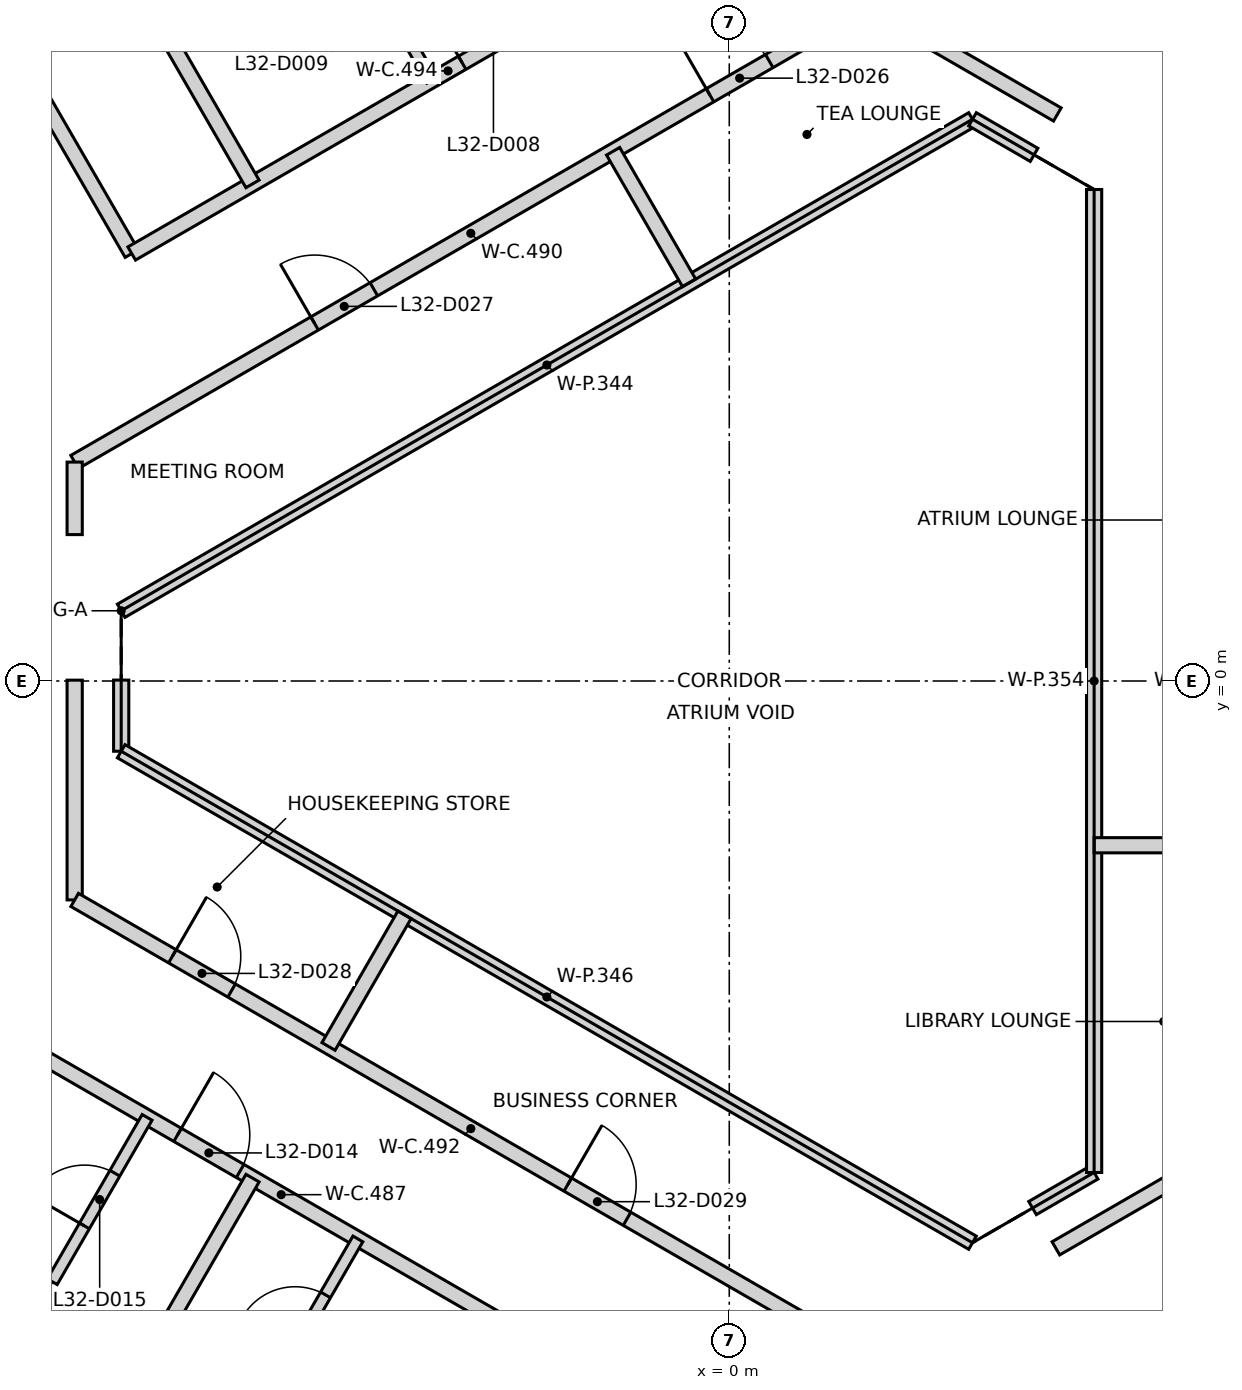
"""IFC4 building model, lengths in metres.
Left out: names, types, materials, properties, quantities, classifications, styles, units other than length and angle.
Written with IfcOpenShell. Run it as: python <this file> out.ifc"""

import sys

from ifc_helpers import new_model, si_unit, direction, frame, frame_2d, origin, place, context, subcontext, project, spatial, rectangle, extrude, element, fill, save


model = new_model("IFC4")
c1 = context("Model", 3, precision=1e-05, world=origin(), true_north=direction((0.0, 1.0)))
c2 = subcontext(c1, "Body", "Model", "MODEL_VIEW")
j1 = project(units=[si_unit("LENGTHUNIT", "METRE"), si_unit("PLANEANGLEUNIT", "RADIAN")], contexts=[c1])
p1 = place(None, origin())
s1 = spatial("IfcSite", under=j1, at=p1, CompositionType="ELEMENT")
p2 = place(p1, origin())
s2 = spatial("IfcBuilding", under=s1, at=p2, CompositionType="ELEMENT")
p3 = place(p2, frame((0.0, 0.0, 132.4)))
s3 = spatial("IfcBuildingStorey", under=s2, at=p3, CompositionType="ELEMENT", Elevation=132.4)
p4 = place(p3, frame((10.42, 6.498, 0.0), z_axis=(0.0, 0.0, 1.0), x_axis=(-0.866021906294, 0.500006057782, 0.0)))
e1 = element("IfcWall", 1, at=p4, inside=s3, PredefinedType="SHEAR", context=c2, shape_type="SweptSolid", body=[
    extrude(rectangle(XDim=11.55, YDim=0.25, at=frame_2d((5.775, 0.0))), origin(), (0.0, 0.0, 1.0), 3.2),
])
p5 = place(p4, frame((10.025, 0.0, 0.0)))
e2 = element("IfcOpeningElement", 2, at=p5, cuts=e1, PredefinedType="OPENING", context=c2, shape_type="SweptSolid", body=[
    extrude(rectangle(XDim=1.2, YDim=2.1, at=frame_2d((0.6, 1.05))), frame((0.0, 0.135, 0.0), z_axis=(0.0, -1.0, 0.0), x_axis=(1.0, 0.0, 0.0)), (0.0, 0.0, 1.0), 0.27),
])
p6 = place(p4, frame((8.725, 0.0, 0.0)))
e3 = element("IfcOpeningElement", 3, at=p6, cuts=e1, PredefinedType="OPENING", context=c2, shape_type="SweptSolid", body=[
    extrude(rectangle(XDim=1.2, YDim=2.1, at=frame_2d((0.6, 1.05))), frame((0.0, 0.135, 0.0), z_axis=(0.0, -1.0, 0.0), x_axis=(1.0, 0.0, 0.0)), (0.0, 0.0, 1.0), 0.27),
])
p7 = place(p3, frame((0.417, -12.273, 0.0), z_axis=(0.0, 0.0, 1.0), x_axis=(0.866021906294, 0.500006057782, 0.0)))
e4 = element("IfcWall", 4, at=p7, inside=s3, PredefinedType="SHEAR", context=c2, shape_type="SweptSolid", body=[
    extrude(rectangle(XDim=11.55, YDim=0.25, at=frame_2d((5.775, 0.0))), origin(), (0.0, 0.0, 1.0), 3.2),
])
p8 = place(p7, frame((10.025, 0.0, 0.0)))
e5 = element("IfcOpeningElement", 5, at=p8, cuts=e4, PredefinedType="OPENING", context=c2, shape_type="SweptSolid", body=[
    extrude(rectangle(XDim=1.2, YDim=2.1, at=frame_2d((0.6, 1.05))), frame((0.0, 0.135, 0.0), z_axis=(0.0, -1.0, 0.0), x_axis=(1.0, 0.0, 0.0)), (0.0, 0.0, 1.0), 0.27),
])
p9 = place(p7, frame((8.725, 0.0, 0.0)))
e6 = element("IfcOpeningElement", 6, at=p9, cuts=e4, PredefinedType="OPENING", context=c2, shape_type="SweptSolid", body=[
    extrude(rectangle(XDim=1.2, YDim=2.1, at=frame_2d((0.6, 1.05))), frame((0.0, 0.135, 0.0), z_axis=(0.0, -1.0, 0.0), x_axis=(1.0, 0.0, 0.0)), (0.0, 0.0, 1.0), 0.27),
])
p10 = place(p3, frame((-9.262, -4.814, 0.0), z_axis=(0.0, 0.0, 1.0), x_axis=(0.866109782156, -0.499853823887, 0.0)))
e7 = element("IfcWall", 7, at=p10, inside=s3, PredefinedType="PARTITIONING", context=c2, shape_type="SweptSolid", body=[
    extrude(rectangle(XDim=7.776, YDim=0.2, at=frame_2d((3.888, 0.0))), origin(), (0.0, 0.0, 1.0), 3.2),
])
p11 = place(p10, frame((2.314, 0.0, 0.0)))
e8 = element("IfcOpeningElement", 8, at=p11, cuts=e7, PredefinedType="OPENING", context=c2, shape_type="SweptSolid", body=[
    extrude(rectangle(XDim=0.95, YDim=2.1, at=frame_2d((0.475, 1.05))), frame((0.0, 0.11, 0.0), z_axis=(0.0, -1.0, 0.0), x_axis=(1.0, 0.0, 0.0)), (0.0, 0.0, 1.0), 0.22),
])
p12 = place(p3, frame((-9.033, 7.651, 0.0), z_axis=(0.0, 0.0, 1.0), x_axis=(0.500354010599, -0.865820919173, 0.0)))
e9 = element("IfcWall", 9, at=p12, inside=s3, PredefinedType="PARTITIONING", context=c2, shape_type="SweptSolid", body=[
    extrude(rectangle(XDim=2.342, YDim=0.2, at=frame_2d((1.171, 0.0))), origin(), (0.0, 0.0, 1.0), 3.2),
])
p13 = place(p3, frame((-8.613, 2.881, 0.0), z_axis=(0.0, 0.0, 1.0), x_axis=(0.866103179807, 0.499865263774, 0.0)))
e10 = element("IfcWall", 10, at=p13, inside=s3, PredefinedType="PARTITIONING", context=c2, shape_type="SweptSolid", body=[
    extrude(rectangle(XDim=12.036, YDim=0.2, at=frame_2d((6.018, 0.0))), origin(), (0.0, 0.0, 1.0), 3.2),
])
p14 = place(p13, frame((9.652, 0.0, 0.0)))
e11 = element("IfcOpeningElement", 11, at=p14, cuts=e10, PredefinedType="OPENING", context=c2, shape_type="SweptSolid", body=[
    extrude(rectangle(XDim=0.9, YDim=2.1, at=frame_2d((0.45, 1.05))), frame((0.0, 0.11, 0.0), z_axis=(0.0, -1.0, 0.0), x_axis=(1.0, 0.0, 0.0)), (0.0, 0.0, 1.0), 0.22),
])
p15 = place(p13, frame((3.646, 0.0, 0.0)))
e12 = element("IfcOpeningElement", 12, at=p15, cuts=e10, PredefinedType="OPENING", context=c2, shape_type="SweptSolid", body=[
    extrude(rectangle(XDim=0.9, YDim=2.1, at=frame_2d((0.45, 1.05))), frame((0.0, 0.11, 0.0), z_axis=(0.0, -1.0, 0.0), x_axis=(1.0, 0.0, 0.0)), (0.0, 0.0, 1.0), 0.22),
])
p16 = place(p3, frame((-8.612, -2.88, 0.0), z_axis=(0.0, 0.0, 1.0), x_axis=(0.0, 1.0, 0.0)))
e13 = element("IfcWall", 13, at=p16, inside=s3, PredefinedType="PARTITIONING", context=c2, shape_type="SweptSolid", body=[
    extrude(rectangle(XDim=2.891, YDim=0.2, at=frame_2d((1.445, 0.0))), origin(), (0.0, 0.0, 1.0), 2.3),
])
p17 = place(p3, frame((-8.612, -2.88, 0.0), z_axis=(0.0, 0.0, 1.0), x_axis=(0.866035279512, -0.499982894348, 0.0)))
e14 = element("IfcWall", 14, at=p17, inside=s3, PredefinedType="PARTITIONING", context=c2, shape_type="SweptSolid", body=[
    extrude(rectangle(XDim=12.037, YDim=0.2, at=frame_2d((6.018, 0.0))), origin(), (0.0, 0.0, 1.0), 3.2),
])
p18 = place(p17, frame((1.484, 0.0, 0.0)))
e15 = element("IfcOpeningElement", 15, at=p18, cuts=e14, PredefinedType="OPENING", context=c2, shape_type="SweptSolid", body=[
    extrude(rectangle(XDim=0.9, YDim=2.1, at=frame_2d((0.45, 1.05))), frame((0.0, 0.11, 0.0), z_axis=(0.0, -1.0, 0.0), x_axis=(1.0, 0.0, 0.0)), (0.0, 0.0, 1.0), 0.22),
])
p19 = place(p17, frame((7.491, 0.0, 0.0)))
e16 = element("IfcOpeningElement", 16, at=p19, cuts=e14, PredefinedType="OPENING", context=c2, shape_type="SweptSolid", body=[
    extrude(rectangle(XDim=0.9, YDim=2.1, at=frame_2d((0.45, 1.05))), frame((0.0, 0.11, 0.0), z_axis=(0.0, -1.0, 0.0), x_axis=(1.0, 0.0, 0.0)), (0.0, 0.0, 1.0), 0.22),
])
p20 = place(p3, frame((-8.612, 1.926, 0.0), z_axis=(0.0, 0.0, 1.0), x_axis=(0.0, 1.0, 0.0)))
e17 = element("IfcWall", 17, at=p20, inside=s3, PredefinedType="PARTITIONING", context=c2, shape_type="SweptSolid", body=[
    extrude(rectangle(XDim=0.954, YDim=0.2, at=frame_2d((0.477, 0.0))), origin(), (0.0, 0.0, 1.0), 3.2),
])
p21 = place(p3, frame((-7.862, 5.624, 0.0), z_axis=(0.0, 0.0, 1.0), x_axis=(0.866109024618, 0.499855136491, 0.0)))
e18 = element("IfcWall", 18, at=p21, inside=s3, PredefinedType="PARTITIONING", context=c2, shape_type="SweptSolid", body=[
    extrude(rectangle(XDim=9.61, YDim=0.2, at=frame_2d((4.805, 0.0))), origin(), (0.0, 0.0, 1.0), 3.2),
])
p22 = place(p21, frame((6.345, 0.0, 0.0)))
e19 = element("IfcOpeningElement", 19, at=p22, cuts=e18, PredefinedType="OPENING", context=c2, shape_type="SweptSolid", body=[
    extrude(rectangle(XDim=0.95, YDim=2.1, at=frame_2d((0.475, 1.05))), frame((0.0, 0.11, 0.0), z_axis=(0.0, -1.0, 0.0), x_axis=(1.0, 0.0, 0.0)), (0.0, 0.0, 1.0), 0.22),
])
p23 = place(p21, frame((5.02, 0.0, 0.0)))
e20 = element("IfcOpeningElement", 20, at=p23, cuts=e18, PredefinedType="OPENING", context=c2, shape_type="SweptSolid", body=[
    extrude(rectangle(XDim=0.95, YDim=2.1, at=frame_2d((0.475, 1.05))), frame((0.0, 0.11, 0.0), z_axis=(0.0, -1.0, 0.0), x_axis=(1.0, 0.0, 0.0)), (0.0, 0.0, 1.0), 0.22),
])
p24 = place(p3, frame((1.813, 8.899, 0.0), z_axis=(0.0, 0.0, 1.0), x_axis=(0.865957732194, -0.50011719232, 0.0)))
e21 = element("IfcWall", 21, at=p24, inside=s3, PredefinedType="PARTITIONING", context=c2, shape_type="SweptSolid", body=[
    extrude(rectangle(XDim=2.891, YDim=0.2, at=frame_2d((1.445, 0.0))), origin(), (0.0, 0.0, 1.0), 2.3),
])
p25 = place(p3, frame((4.297, -7.464, 0.0), z_axis=(0.0, 0.0, 1.0), x_axis=(0.86602521942, 0.500000319328, 0.0)))
e22 = element("IfcWall", 22, at=p25, inside=s3, PredefinedType="PARTITIONING", context=c2, shape_type="SweptSolid", body=[
    extrude(rectangle(XDim=2.89, YDim=0.2, at=frame_2d((1.445, 0.0))), origin(), (0.0, 0.0, 1.0), 2.3),
])
p26 = place(p3, frame((-12.279, 16.946, 0.0), z_axis=(0.0, 0.0, 1.0), x_axis=(0.499902454835, -0.866081714187, 0.0)))
e23 = element("IfcWall", 23, at=p26, inside=s3, PredefinedType="PARTITIONING", context=c2, shape_type="SweptSolid", body=[
    extrude(rectangle(XDim=12.015, YDim=0.2, at=frame_2d((6.008, 0.0))), origin(), (0.0, 0.0, 1.0), 3.2),
])
p27 = place(p3, frame((-12.278, -16.946, 0.0), z_axis=(0.0, 0.0, 1.0), x_axis=(0.499887212932, 0.866090511637, 0.0)))
e24 = element("IfcWall", 24, at=p27, inside=s3, PredefinedType="PARTITIONING", context=c2, shape_type="SweptSolid", body=[
    extrude(rectangle(XDim=12.015, YDim=0.2, at=frame_2d((6.007, 0.0))), origin(), (0.0, 0.0, 1.0), 3.2),
])
p28 = place(p3, frame((-8.0, 0.924, 0.0), z_axis=(0.0, 0.0, 1.0), x_axis=(0.86604129137, 0.499972480886, 0.0)))
e25 = element("IfcWall", 25, at=p28, inside=s3, PredefinedType="PARTITIONING", context=c2, shape_type="SweptSolid", body=[
    extrude(rectangle(XDim=12.932, YDim=0.2, at=frame_2d((6.466, 0.0))), origin(), (0.0, 0.0, 1.0), 2.3),
])
p29 = place(p3, frame((-8.0, -0.924, 0.0), z_axis=(0.0, 0.0, 1.0), x_axis=(0.0, 1.0, 0.0)))
e26 = element("IfcWall", 26, at=p29, inside=s3, PredefinedType="PARTITIONING", context=c2, shape_type="SweptSolid", body=[
    extrude(rectangle(XDim=0.936, YDim=0.2, at=frame_2d((0.468, 0.0))), origin(), (0.0, 0.0, 1.0), 2.3),
])
p30 = place(p3, frame((-8.0, -0.924, 0.0), z_axis=(0.0, 0.0, 1.0), x_axis=(0.86604129137, -0.499972480886, 0.0)))
e27 = element("IfcWall", 27, at=p30, inside=s3, PredefinedType="PARTITIONING", context=c2, shape_type="SweptSolid", body=[
    extrude(rectangle(XDim=12.932, YDim=0.2, at=frame_2d((6.466, 0.0))), origin(), (0.0, 0.0, 1.0), 2.3),
])
p31 = place(p3, frame((-5.272, -4.808, 0.0), z_axis=(0.0, 0.0, 1.0), x_axis=(0.499880961361, 0.866094119867, 0.0)))
e28 = element("IfcWall", 28, at=p31, inside=s3, PredefinedType="PARTITIONING", context=c2, shape_type="SweptSolid", body=[
    extrude(rectangle(XDim=2.0, YDim=0.2, at=frame_2d((1.0, 0.0))), origin(), (0.0, 0.0, 1.0), 2.3),
])
p32 = place(p3, frame((-1.528, 6.969, 0.0), z_axis=(0.0, 0.0, 1.0), x_axis=(0.500000846469, -0.866024915075, 0.0)))
e29 = element("IfcWall", 29, at=p32, inside=s3, PredefinedType="PARTITIONING", context=c2, shape_type="SweptSolid", body=[
    extrude(rectangle(XDim=1.999, YDim=0.2, at=frame_2d((1.0, 0.0))), origin(), (0.0, 0.0, 1.0), 3.2),
])
p33 = place(p3, frame((3.2, 7.39, 0.0), z_axis=(0.0, 0.0, 1.0), x_axis=(0.865985641702, -0.500068863623, 0.0)))
e30 = element("IfcWall", 30, at=p33, inside=s3, PredefinedType="PARTITIONING", context=c2, shape_type="SweptSolid", body=[
    extrude(rectangle(XDim=0.935, YDim=0.2, at=frame_2d((0.468, 0.0))), origin(), (0.0, 0.0, 1.0), 2.3),
])
p34 = place(p3, frame((3.99, -6.934, 0.0), z_axis=(0.0, 0.0, 1.0), x_axis=(0.865872609263, 0.500264554538, 0.0)))
e31 = element("IfcWall", 31, at=p34, inside=s3, PredefinedType="PARTITIONING", context=c2, shape_type="SweptSolid", body=[
    extrude(rectangle(XDim=0.936, YDim=0.2, at=frame_2d((0.468, 0.0))), origin(), (0.0, 0.0, 1.0), 2.3),
])
p35 = place(p3, frame((4.8, -6.466, 0.0), z_axis=(0.0, 0.0, 1.0), x_axis=(0.0, 1.0, 0.0)))
e32 = element("IfcWall", 32, at=p35, inside=s3, PredefinedType="PARTITIONING", context=c2, shape_type="SweptSolid", body=[
    extrude(rectangle(XDim=12.932, YDim=0.2, at=frame_2d((6.466, 0.0))), origin(), (0.0, 0.0, 1.0), 2.3),
])
p36 = place(p3, frame((4.8, -2.161, 0.0), z_axis=(0.0, 0.0, 1.0), x_axis=(1.0, 0.0, 0.0)))
e33 = element("IfcWall", 33, at=p36, inside=s3, PredefinedType="PARTITIONING", context=c2, shape_type="SweptSolid", body=[
    extrude(rectangle(XDim=2.0, YDim=0.2, at=frame_2d((1.0, 0.0))), origin(), (0.0, 0.0, 1.0), 2.3),
])
p37 = place(p3, frame((-10.51, -6.98, 0.0), z_axis=(0.0, 0.0, 1.0), x_axis=(0.865965533559, -0.500103683937, 0.0)))
e34 = element("IfcWall", 34, at=p37, inside=s3, PredefinedType="PARTITIONING", context=c2, shape_type="SweptSolid", body=[
    extrude(rectangle(XDim=1.848, YDim=0.15, at=frame_2d((0.924, 0.0))), origin(), (0.0, 0.0, 1.0), 3.2),
])
p38 = place(p3, frame((-8.907, -7.903, 0.0), z_axis=(0.0, 0.0, 1.0), x_axis=(0.499925626596, 0.866068339032, 0.0)))
e35 = element("IfcWall", 35, at=p38, inside=s3, PredefinedType="PARTITIONING", context=c2, shape_type="SweptSolid", body=[
    extrude(rectangle(XDim=2.497, YDim=0.15, at=frame_2d((1.248, 0.0))), origin(), (0.0, 0.0, 1.0), 3.2),
])
p39 = place(p38, frame((0.848, 0.0, 0.0)))
e36 = element("IfcOpeningElement", 36, at=p39, cuts=e35, PredefinedType="OPENING", context=c2, shape_type="SweptSolid", body=[
    extrude(rectangle(XDim=0.8, YDim=2.1, at=frame_2d((0.4, 1.05))), frame((0.0, 0.085, 0.0), z_axis=(0.0, -1.0, 0.0), x_axis=(1.0, 0.0, 0.0)), (0.0, 0.0, 1.0), 0.17),
])
p40 = place(p3, frame((-6.137, -9.505, 0.0), z_axis=(0.0, 0.0, 1.0), x_axis=(0.500339416332, 0.86582935297, 0.0)))
e37 = element("IfcWall", 37, at=p40, inside=s3, PredefinedType="PARTITIONING", context=c2, shape_type="SweptSolid", body=[
    extrude(rectangle(XDim=2.5, YDim=0.15, at=frame_2d((1.25, 0.0))), origin(), (0.0, 0.0, 1.0), 3.2),
])
p41 = place(p40, frame((0.85, 0.0, 0.0)))
e38 = element("IfcOpeningElement", 38, at=p41, cuts=e37, PredefinedType="OPENING", context=c2, shape_type="SweptSolid", body=[
    extrude(rectangle(XDim=0.8, YDim=2.1, at=frame_2d((0.4, 1.05))), frame((0.0, 0.085, 0.0), z_axis=(0.0, -1.0, 0.0), x_axis=(1.0, 0.0, 0.0)), (0.0, 0.0, 1.0), 0.17),
])
p42 = place(p3, frame((-5.164, 10.067, 0.0), z_axis=(0.0, 0.0, 1.0), x_axis=(0.500046524342, -0.865998541277, 0.0)))
e39 = element("IfcWall", 39, at=p42, inside=s3, PredefinedType="PARTITIONING", context=c2, shape_type="SweptSolid", body=[
    extrude(rectangle(XDim=2.5, YDim=0.15, at=frame_2d((1.25, 0.0))), origin(), (0.0, 0.0, 1.0), 3.2),
])
p43 = place(p42, frame((0.85, 0.0, 0.0)))
e40 = element("IfcOpeningElement", 40, at=p43, cuts=e39, PredefinedType="OPENING", context=c2, shape_type="SweptSolid", body=[
    extrude(rectangle(XDim=0.8, YDim=2.1, at=frame_2d((0.4, 1.05))), frame((0.0, 0.085, 0.0), z_axis=(0.0, -1.0, 0.0), x_axis=(1.0, 0.0, 0.0)), (0.0, 0.0, 1.0), 0.17),
])
p44 = place(p23, origin())
e41 = element("IfcDoor", 41, at=p44, inside=s3, OperationType="SINGLE_SWING_LEFT", PredefinedType="DOOR", context=c2, shape_type="SweptSolid", body=[
    extrude(rectangle(XDim=0.95, YDim=2.1, at=frame_2d((0.475, 1.05))), frame((0.0, 0.025, 0.0), z_axis=(0.0, -1.0, 0.0), x_axis=(1.0, 0.0, 0.0)), (0.0, 0.0, 1.0), 0.05),
])
fill(e20, e41)
p45 = place(p11, frame((0.95, 0.0, 0.0), z_axis=(0.0, 0.0, 1.0), x_axis=(-1.0, 0.0, 0.0)))
e42 = element("IfcDoor", 42, at=p45, inside=s3, OperationType="SINGLE_SWING_LEFT", PredefinedType="DOOR", context=c2, shape_type="SweptSolid", body=[
    extrude(rectangle(XDim=0.95, YDim=2.1, at=frame_2d((0.475, 1.05))), frame((0.0, 0.025, 0.0), z_axis=(0.0, -1.0, 0.0), x_axis=(1.0, 0.0, 0.0)), (0.0, 0.0, 1.0), 0.05),
])
fill(e8, e42)
p46 = place(p39, origin())
e43 = element("IfcDoor", 43, at=p46, inside=s3, OperationType="SINGLE_SWING_LEFT", PredefinedType="DOOR", context=c2, shape_type="SweptSolid", body=[
    extrude(rectangle(XDim=0.8, YDim=2.1, at=frame_2d((0.4, 1.05))), frame((0.0, 0.025, 0.0), z_axis=(0.0, -1.0, 0.0), x_axis=(1.0, 0.0, 0.0)), (0.0, 0.0, 1.0), 0.05),
])
fill(e36, e43)
p47 = place(p41, frame((0.8, 0.0, 0.0), z_axis=(0.0, 0.0, 1.0), x_axis=(-1.0, 0.0, 0.0)))
e44 = element("IfcDoor", 44, at=p47, inside=s3, OperationType="SINGLE_SWING_LEFT", PredefinedType="DOOR", context=c2, shape_type="SweptSolid", body=[
    extrude(rectangle(XDim=0.8, YDim=2.1, at=frame_2d((0.4, 1.05))), frame((0.0, 0.025, 0.0), z_axis=(0.0, -1.0, 0.0), x_axis=(1.0, 0.0, 0.0)), (0.0, 0.0, 1.0), 0.05),
])
fill(e38, e44)
p48 = place(p14, frame((0.9, 0.0, 0.0), z_axis=(0.0, 0.0, 1.0), x_axis=(-1.0, 0.0, 0.0)))
e45 = element("IfcDoor", 45, at=p48, inside=s3, OperationType="SINGLE_SWING_LEFT", PredefinedType="DOOR", context=c2, shape_type="SweptSolid", body=[
    extrude(rectangle(XDim=0.9, YDim=2.1, at=frame_2d((0.45, 1.05))), frame((0.0, 0.025, 0.0), z_axis=(0.0, -1.0, 0.0), x_axis=(1.0, 0.0, 0.0)), (0.0, 0.0, 1.0), 0.05),
])
fill(e11, e45)
p49 = place(p15, frame((0.9, 0.0, 0.0), z_axis=(0.0, 0.0, 1.0), x_axis=(-1.0, 0.0, 0.0)))
e46 = element("IfcDoor", 46, at=p49, inside=s3, OperationType="SINGLE_SWING_LEFT", PredefinedType="DOOR", context=c2, shape_type="SweptSolid", body=[
    extrude(rectangle(XDim=0.9, YDim=2.1, at=frame_2d((0.45, 1.05))), frame((0.0, 0.025, 0.0), z_axis=(0.0, -1.0, 0.0), x_axis=(1.0, 0.0, 0.0)), (0.0, 0.0, 1.0), 0.05),
])
fill(e12, e46)
p50 = place(p18, origin())
e47 = element("IfcDoor", 47, at=p50, inside=s3, OperationType="SINGLE_SWING_LEFT", PredefinedType="DOOR", context=c2, shape_type="SweptSolid", body=[
    extrude(rectangle(XDim=0.9, YDim=2.1, at=frame_2d((0.45, 1.05))), frame((0.0, 0.025, 0.0), z_axis=(0.0, -1.0, 0.0), x_axis=(1.0, 0.0, 0.0)), (0.0, 0.0, 1.0), 0.05),
])
fill(e15, e47)
p51 = place(p19, origin())
e48 = element("IfcDoor", 48, at=p51, inside=s3, OperationType="SINGLE_SWING_LEFT", PredefinedType="DOOR", context=c2, shape_type="SweptSolid", body=[
    extrude(rectangle(XDim=0.9, YDim=2.1, at=frame_2d((0.45, 1.05))), frame((0.0, 0.025, 0.0), z_axis=(0.0, -1.0, 0.0), x_axis=(1.0, 0.0, 0.0)), (0.0, 0.0, 1.0), 0.05),
])
fill(e16, e48)
save(model, sys.argv[1])
